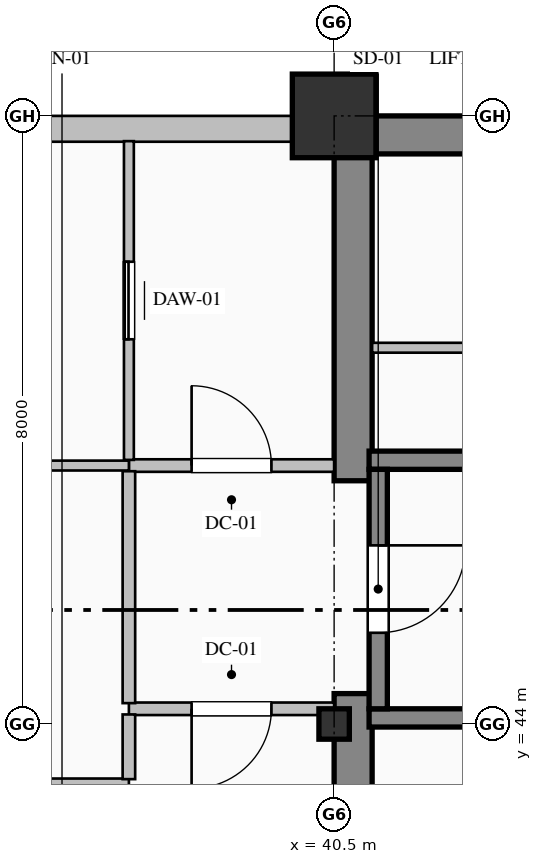
"""IFC4 building model, lengths in metres.
Left out: names, types, materials, properties, quantities, classifications, styles, units other than length and angle.
Written with IfcOpenShell. Run it as: python <this file> out.ifc"""

import sys

from ifc_helpers import new_model, si_unit, direction, frame, frame_2d, origin, origin_2d, place, context, subcontext, project, spatial, rectangle, hollow_rectangle, i_section, extrude, element, fill, save


model = new_model("IFC4")
c1 = context("Model", 3, precision=1e-05, world=origin(), true_north=direction((0.0, 1.0)))
c2 = subcontext(c1, "Body", "Model", "MODEL_VIEW")
j1 = project(units=[si_unit("LENGTHUNIT", "METRE"), si_unit("PLANEANGLEUNIT", "RADIAN")], contexts=[c1])
p1 = place(None, origin())
s1 = spatial("IfcSite", under=j1, at=p1, CompositionType="ELEMENT")
p2 = place(p1, origin())
s2 = spatial("IfcBuilding", under=s1, at=p2, CompositionType="ELEMENT")
p3 = place(p2, frame((0.0, 0.0, 143.0)))
s3 = spatial("IfcBuildingStorey", under=s2, at=p3, CompositionType="ELEMENT", Elevation=143.0)
p4 = place(p3, frame((40.5, 51.75, 0.0), z_axis=(0.0, 0.0, 1.0), x_axis=(1.0, 0.0, 0.0)))
e1 = element("IfcWall", 1, at=p4, inside=s3, PredefinedType="SHEAR", context=c2, shape_type="SweptSolid", body=[
    extrude(rectangle(XDim=23.5, YDim=0.5, at=frame_2d((11.75, 0.0))), origin(), (0.0, 0.0, 1.0), 3.765),
])
p5 = place(p3, frame((40.75, 36.5, 0.0), z_axis=(0.0, 0.0, 1.0), x_axis=(0.0, 1.0, 0.0)))
e2 = element("IfcWall", 2, at=p5, inside=s3, PredefinedType="SHEAR", context=c2, shape_type="SweptSolid", body=[
    extrude(rectangle(XDim=7.9, YDim=0.5, at=frame_2d((3.95, 0.0))), origin(), (0.0, 0.0, 1.0), 3.765),
])
p6 = place(p3, frame((40.75, 47.2, 0.0), z_axis=(0.0, 0.0, 1.0), x_axis=(0.0, 1.0, 0.0)))
e3 = element("IfcWall", 3, at=p6, inside=s3, PredefinedType="SHEAR", context=c2, shape_type="SweptSolid", body=[
    extrude(rectangle(XDim=4.3, YDim=0.5, at=frame_2d((2.15, 0.0))), origin(), (0.0, 0.0, 1.0), 3.765),
])
p7 = place(p3, frame((40.5, 44.0, 0.0), z_axis=(0.0, 0.0, 1.0), x_axis=(1.0, 0.0, 0.0)))
e4 = element("IfcColumn", 4, at=p7, inside=s3, PredefinedType="COLUMN", context=c2, shape_type="SweptSolid", body=[
    extrude(i_section(OverallWidth=0.4, OverallDepth=0.4, WebThickness=0.013, FlangeThickness=0.021, FilletRadius=0.022, at=origin_2d()), origin(), (0.0, 0.0, 1.0), 4.0),
])
p8 = place(p3, frame((40.5, 52.0, 0.0), z_axis=(0.0, 0.0, 1.0), x_axis=(1.0, 0.0, 0.0)))
e5 = element("IfcColumn", 5, at=p8, inside=s3, PredefinedType="COLUMN", context=c2, shape_type="SweptSolid", body=[
    extrude(hollow_rectangle(XDim=1.1, YDim=1.1, WallThickness=0.04, at=origin_2d()), origin(), (0.0, 0.0, 1.0), 4.0),
])
p9 = place(p3, frame((13.0, 51.83, 0.0), z_axis=(0.0, 0.0, 1.0), x_axis=(1.0, 0.0, 0.0)))
e6 = element("IfcWall", 6, at=p9, inside=s3, PredefinedType="SOLIDWALL", context=c2, shape_type="SweptSolid", body=[
    extrude(rectangle(XDim=27.52, YDim=0.34, at=frame_2d((13.76, 0.0))), origin(), (0.0, 0.0, 1.0), 3.265),
])
p10 = place(p9, frame((6.375, 0.0, 0.85)))
e7 = element("IfcOpeningElement", 7, at=p10, cuts=e6, PredefinedType="OPENING", context=c2, shape_type="SweptSolid", body=[
    extrude(rectangle(XDim=1.65, YDim=1.95, at=frame_2d((0.825, 0.975))), frame((0.0, 0.18, 0.0), z_axis=(0.0, -1.0, 0.0), x_axis=(1.0, 0.0, 0.0)), (0.0, 0.0, 1.0), 0.36),
])
p11 = place(p9, frame((13.65, 0.0, 0.85)))
e8 = element("IfcOpeningElement", 8, at=p11, cuts=e6, PredefinedType="OPENING", context=c2, shape_type="SweptSolid", body=[
    extrude(rectangle(XDim=1.5, YDim=1.95, at=frame_2d((0.75, 0.975))), frame((0.0, 0.18, 0.0), z_axis=(0.0, -1.0, 0.0), x_axis=(1.0, 0.0, 0.0)), (0.0, 0.0, 1.0), 0.36),
])
for number, where, z_axis, x_axis in (
    (9, (40.96, 47.47, 0.0), (0.0, 0.0, 1.0), (1.0, 0.0, 0.0)),
    (10, (49.04, 44.08, 0.0), (0.0, 0.0, 1.0), (-1.0, 0.0, 0.0)),
):
    element("IfcWall", number, at=place(p3, frame(where, z_axis=z_axis, x_axis=x_axis)), inside=s3, PredefinedType="SOLIDWALL", context=c2, shape_type="SweptSolid", body=[
        extrude(rectangle(XDim=8.08, YDim=0.24, at=frame_2d((4.04, 0.0))), origin(), (0.0, 0.0, 1.0), 4.0),
    ])
p12 = place(p3, frame((41.08, 47.35, 0.0), z_axis=(0.0, 0.0, 1.0), x_axis=(0.0, -1.0, 0.0)))
e11 = element("IfcWall", 11, at=p12, inside=s3, PredefinedType="SOLIDWALL", context=c2, shape_type="SweptSolid", body=[
    extrude(rectangle(XDim=3.15, YDim=0.24, at=frame_2d((1.575, 0.0))), origin(), (0.0, 0.0, 1.0), 4.0),
])
p13 = place(p12, frame((1.0, 0.0, 0.0)))
e12 = element("IfcOpeningElement", 12, at=p13, cuts=e11, PredefinedType="OPENING", context=c2, shape_type="SweptSolid", body=[
    extrude(rectangle(XDim=1.15, YDim=2.2, at=frame_2d((0.575, 1.1))), frame((0.0, 0.13, 0.0), z_axis=(0.0, -1.0, 0.0), x_axis=(1.0, 0.0, 0.0)), (0.0, 0.0, 1.0), 0.26),
])
p14 = place(p3, frame((37.8, 47.4, 0.0), z_axis=(0.0, 0.0, 1.0), x_axis=(1.0, 0.0, 0.0)))
e13 = element("IfcWall", 13, at=p14, inside=s3, PredefinedType="PARTITIONING", context=c2, shape_type="SweptSolid", body=[
    extrude(rectangle(XDim=2.7, YDim=0.165, at=frame_2d((1.35, 0.0))), origin(), (0.0, 0.0, 1.0), 3.765),
])
p15 = place(p14, frame((0.825, 0.0, 0.0)))
e14 = element("IfcOpeningElement", 14, at=p15, cuts=e13, PredefinedType="OPENING", context=c2, shape_type="SweptSolid", body=[
    extrude(rectangle(XDim=1.05, YDim=2.15, at=frame_2d((0.525, 1.075))), frame((0.0, 0.093, 0.0), z_axis=(0.0, -1.0, 0.0), x_axis=(1.0, 0.0, 0.0)), (0.0, 0.0, 1.0), 0.185),
])
p16 = place(p3, frame((40.5, 44.2, 0.0), z_axis=(0.0, 0.0, 1.0), x_axis=(-1.0, 0.0, 0.0)))
e15 = element("IfcWall", 15, at=p16, inside=s3, PredefinedType="PARTITIONING", context=c2, shape_type="SweptSolid", body=[
    extrude(rectangle(XDim=2.7, YDim=0.165, at=frame_2d((1.35, 0.0))), origin(), (0.0, 0.0, 1.0), 3.765),
])
p17 = place(p16, frame((0.825, 0.0, 0.0)))
e16 = element("IfcOpeningElement", 16, at=p17, cuts=e15, PredefinedType="OPENING", context=c2, shape_type="SweptSolid", body=[
    extrude(rectangle(XDim=1.05, YDim=2.15, at=frame_2d((0.525, 1.075))), frame((0.0, 0.093, 0.0), z_axis=(0.0, -1.0, 0.0), x_axis=(1.0, 0.0, 0.0)), (0.0, 0.0, 1.0), 0.185),
])
p18 = place(p3, frame((37.8, 44.274, 0.0), z_axis=(0.0, 0.0, 1.0), x_axis=(0.0, 1.0, 0.0)))
e17 = element("IfcWall", 17, at=p18, inside=s3, PredefinedType="PARTITIONING", context=c2, shape_type="SweptSolid", body=[
    extrude(rectangle(XDim=3.051, YDim=0.165, at=frame_2d((1.525, 0.0))), origin(), (0.0, 0.0, 1.0), 3.765),
])
p19 = place(p3, frame((37.8, 47.475, 0.0), z_axis=(0.0, 0.0, 1.0), x_axis=(0.0, 1.0, 0.0)))
e18 = element("IfcWall", 18, at=p19, inside=s3, PredefinedType="PARTITIONING", context=c2, shape_type="SweptSolid", body=[
    extrude(rectangle(XDim=4.193, YDim=0.13, at=frame_2d((2.097, 0.0))), origin(), (0.0, 0.0, 1.0), 3.765),
])
p20 = place(p19, frame((1.587, 0.0, 0.0)))
e19 = element("IfcOpeningElement", 19, at=p20, cuts=e18, PredefinedType="OPENING", context=c2, shape_type="SweptSolid", body=[
    extrude(rectangle(XDim=1.02, YDim=2.15, at=frame_2d((0.51, 1.075))), frame((0.0, 0.075, 0.0), z_axis=(0.0, -1.0, 0.0), x_axis=(1.0, 0.0, 0.0)), (0.0, 0.0, 1.0), 0.15),
])
p21 = place(p3, frame((37.8, 47.4, 0.0), z_axis=(0.0, 0.0, 1.0), x_axis=(-1.0, 0.0, 0.0)))
e20 = element("IfcWall", 20, at=p21, inside=s3, PredefinedType="PARTITIONING", context=c2, shape_type="SweptSolid", body=[
    extrude(rectangle(XDim=2.4, YDim=0.13, at=frame_2d((1.2, 0.0))), origin(), (0.0, 0.0, 1.0), 3.765),
])
p22 = place(p3, frame((41.0, 48.95, 0.0), z_axis=(0.0, 0.0, 1.0), x_axis=(1.0, 0.0, 0.0)))
e21 = element("IfcWall", 21, at=p22, inside=s3, PredefinedType="PARTITIONING", context=c2, shape_type="SweptSolid", body=[
    extrude(rectangle(XDim=5.8, YDim=0.13, at=frame_2d((2.9, 0.0))), origin(), (0.0, 0.0, 1.0), 3.765),
])
p23 = place(p22, frame((2.44, 0.0, 0.0)))
e22 = element("IfcOpeningElement", 22, at=p23, cuts=e21, PredefinedType="OPENING", context=c2, shape_type="SweptSolid", body=[
    extrude(rectangle(XDim=0.92, YDim=2.15, at=frame_2d((0.46, 1.075))), frame((0.0, 0.075, 0.0), z_axis=(0.0, -1.0, 0.0), x_axis=(1.0, 0.0, 0.0)), (0.0, 0.0, 1.0), 0.15),
])
p24 = place(p3, frame((24.5, 43.2, 0.0), z_axis=(0.0, 0.0, 1.0), x_axis=(1.0, 0.0, 0.0)))
e23 = element("IfcWall", 23, at=p24, inside=s3, PredefinedType="PARTITIONING", context=c2, shape_type="SweptSolid", body=[
    extrude(rectangle(XDim=13.3, YDim=0.165, at=frame_2d((6.65, 0.0))), origin(), (0.0, 0.0, 1.0), 3.765),
])
p25 = place(p24, frame((6.2, 0.0, 0.0)))
e24 = element("IfcOpeningElement", 24, at=p25, cuts=e23, PredefinedType="OPENING", context=c2, shape_type="SweptSolid", body=[
    extrude(rectangle(XDim=0.9, YDim=2.15, at=frame_2d((0.45, 1.075))), frame((0.0, 0.093, 0.0), z_axis=(0.0, -1.0, 0.0), x_axis=(1.0, 0.0, 0.0)), (0.0, 0.0, 1.0), 0.185),
])
p26 = place(p3, frame((37.8, 43.274, 0.0), z_axis=(0.0, 0.0, 1.0), x_axis=(0.0, 1.0, 0.0)))
e25 = element("IfcWall", 25, at=p26, inside=s3, PredefinedType="PARTITIONING", context=c2, shape_type="SweptSolid", body=[
    extrude(rectangle(XDim=0.851, YDim=0.165, at=frame_2d((0.426, 0.0))), origin(), (0.0, 0.0, 1.0), 3.765),
])
p27 = place(p13, origin())
e26 = element("IfcDoor", 26, at=p27, inside=s3, OperationType="SINGLE_SWING_LEFT", PredefinedType="DOOR", context=c2, shape_type="SweptSolid", body=[
    extrude(rectangle(XDim=1.15, YDim=2.2, at=frame_2d((0.575, 1.1))), frame((0.0, 0.025, 0.0), z_axis=(0.0, -1.0, 0.0), x_axis=(1.0, 0.0, 0.0)), (0.0, 0.0, 1.0), 0.05),
])
fill(e12, e26)
p28 = place(p15, origin())
e27 = element("IfcDoor", 27, at=p28, inside=s3, OperationType="SINGLE_SWING_LEFT", PredefinedType="DOOR", context=c2, shape_type="SweptSolid", body=[
    extrude(rectangle(XDim=1.05, YDim=2.15, at=frame_2d((0.525, 1.075))), frame((0.0, 0.025, 0.0), z_axis=(0.0, -1.0, 0.0), x_axis=(1.0, 0.0, 0.0)), (0.0, 0.0, 1.0), 0.05),
])
fill(e14, e27)
p29 = place(p17, origin())
e28 = element("IfcDoor", 28, at=p29, inside=s3, OperationType="SINGLE_SWING_RIGHT", PredefinedType="DOOR", context=c2, shape_type="SweptSolid", body=[
    extrude(rectangle(XDim=1.05, YDim=2.15, at=frame_2d((0.525, 1.075))), frame((0.0, 0.025, 0.0), z_axis=(0.0, -1.0, 0.0), x_axis=(1.0, 0.0, 0.0)), (0.0, 0.0, 1.0), 0.05),
])
fill(e16, e28)
p30 = place(p20, origin())
e29 = element("IfcDoor", 29, at=p30, inside=s3, OperationType="SLIDING_TO_LEFT", PredefinedType="DOOR", context=c2, shape_type="SweptSolid", body=[
    extrude(rectangle(XDim=1.02, YDim=2.15, at=frame_2d((0.51, 1.075))), frame((0.0, 0.025, 0.0), z_axis=(0.0, -1.0, 0.0), x_axis=(1.0, 0.0, 0.0)), (0.0, 0.0, 1.0), 0.05),
])
fill(e19, e29)
save(model, sys.argv[1])
